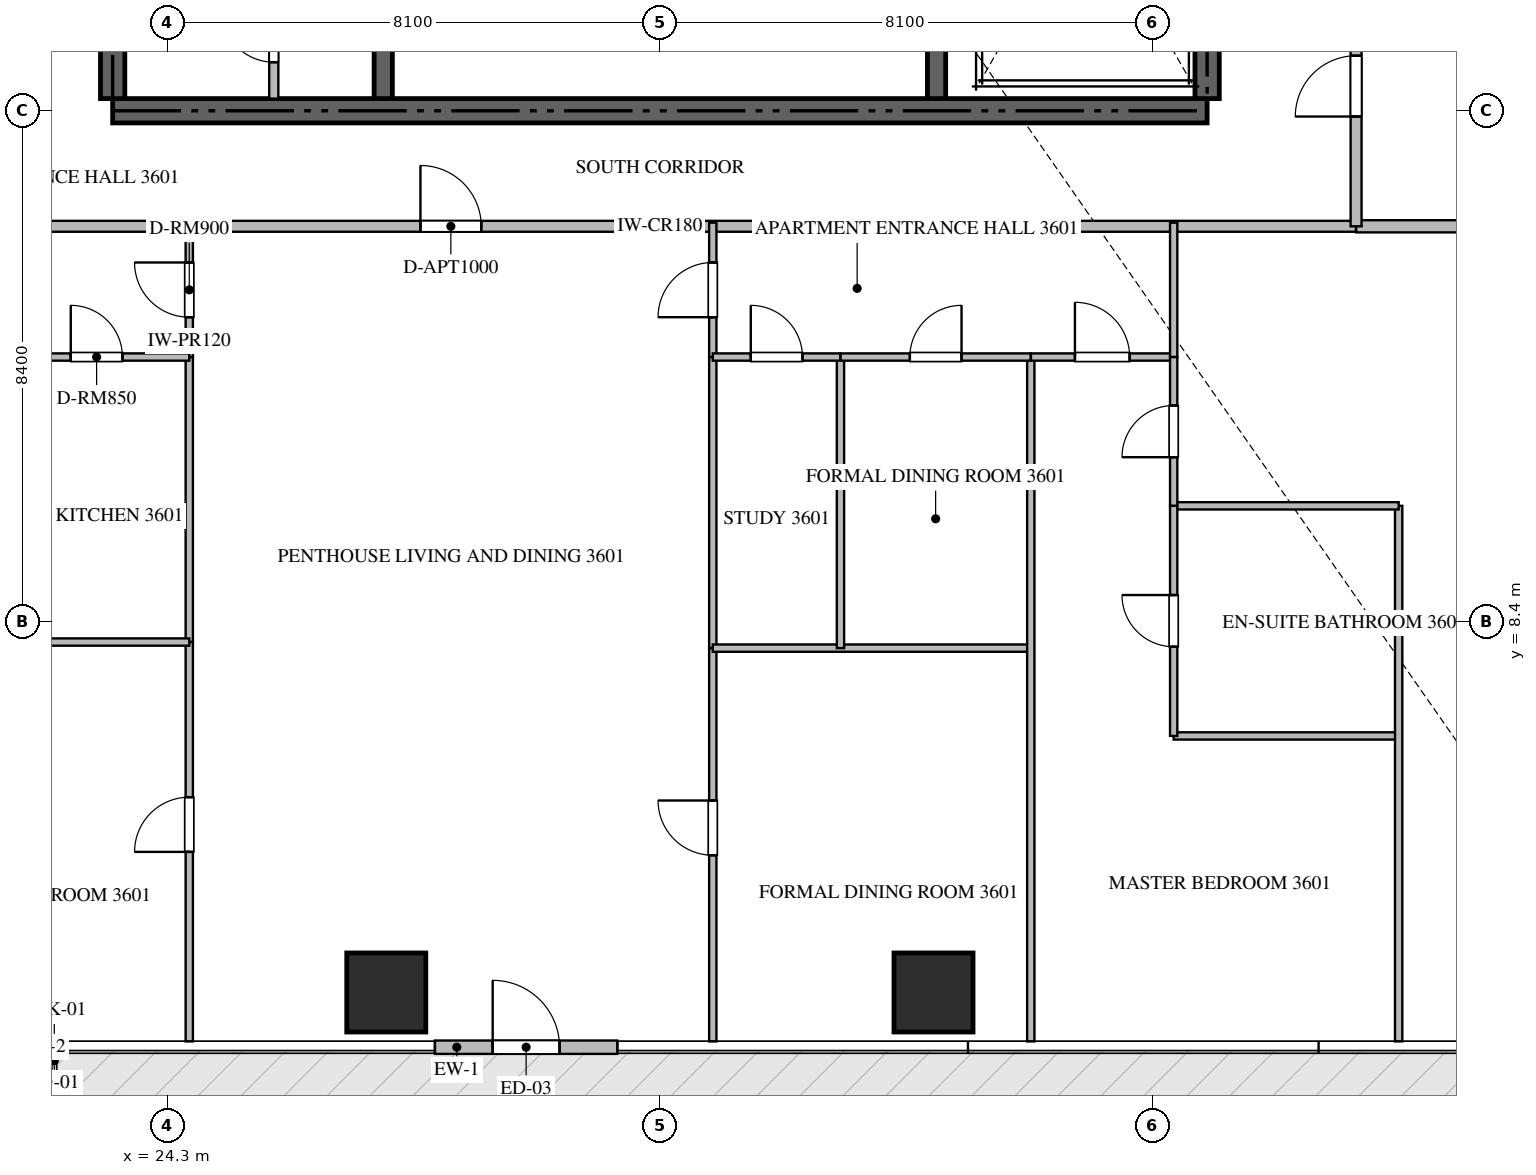
"""IFC4 building model, lengths in metres.
Left out: names, types, materials, properties, quantities, classifications, styles, units other than length and angle.
Written with IfcOpenShell. Run it as: python <this file> out.ifc"""

import sys

from ifc_helpers import new_model, si_unit, direction, frame, frame_2d, origin, origin_2d, place, context, subcontext, project, spatial, rectangle, extrude, source, transform, mapped, element, fill, save


model = new_model("IFC4")
c1 = context("Model", 3, precision=1e-05, world=origin(), true_north=direction((0.0, 1.0)))
c2 = subcontext(c1, "Body", "Model", "MODEL_VIEW")
j1 = project(units=[si_unit("LENGTHUNIT", "METRE"), si_unit("PLANEANGLEUNIT", "RADIAN")], contexts=[c1])
p1 = place(None, origin())
s1 = spatial("IfcSite", under=j1, at=p1, CompositionType="ELEMENT")
p2 = place(p1, origin())
s2 = spatial("IfcBuilding", under=s1, at=p2, CompositionType="ELEMENT")
p3 = place(p2, frame((0.0, 0.0, 146.4)))
s3 = spatial("IfcBuildingStorey", under=s2, at=p3, CompositionType="ELEMENT", Elevation=146.4)
p4 = place(p3, frame((23.4, 16.8, -0.26), z_axis=(0.0, 0.0, 1.0), x_axis=(1.0, 0.0, 0.0)))
e1 = element("IfcWall", 1, at=p4, inside=s3, PredefinedType="SHEAR", context=c2, shape_type="SweptSolid", body=[
    extrude(rectangle(XDim=18.0, YDim=0.4, at=frame_2d((9.0, 0.0))), origin(), (0.0, 0.0, 1.0), 3.748),
])
p5 = place(p3, frame((23.4, 17.0, -0.26), z_axis=(0.0, 0.0, 1.0), x_axis=(0.0, 1.0, 0.0)))
e2 = element("IfcWall", 2, at=p5, inside=s3, PredefinedType="SHEAR", context=c2, shape_type="SweptSolid", body=[
    extrude(rectangle(XDim=4.85, YDim=0.4, at=frame_2d((2.425, 0.0))), origin(), (0.0, 0.0, 1.0), 3.748),
])
p6 = place(p3, frame((41.4, 17.0, -0.26), z_axis=(0.0, 0.0, 1.0), x_axis=(0.0, 1.0, 0.0)))
e3 = element("IfcWall", 3, at=p6, inside=s3, PredefinedType="SHEAR", context=c2, shape_type="SweptSolid", body=[
    extrude(rectangle(XDim=8.35, YDim=0.4, at=frame_2d((4.175, 0.0))), origin(), (0.0, 0.0, 1.0), 3.748),
])
p7 = place(p3, frame((27.85, 17.0, -0.26), z_axis=(0.0, 0.0, 1.0), x_axis=(0.0, 1.0, 0.0)))
e4 = element("IfcWall", 4, at=p7, inside=s3, PredefinedType="SHEAR", context=c2, shape_type="SweptSolid", body=[
    extrude(rectangle(XDim=4.85, YDim=0.3, at=frame_2d((2.425, 0.0))), origin(), (0.0, 0.0, 1.0), 3.748),
])
p8 = place(p3, frame((36.95, 17.0, -0.26), z_axis=(0.0, 0.0, 1.0), x_axis=(0.0, 1.0, 0.0)))
e5 = element("IfcWall", 5, at=p8, inside=s3, PredefinedType="SHEAR", context=c2, shape_type="SweptSolid", body=[
    extrude(rectangle(XDim=8.35, YDim=0.3, at=frame_2d((4.175, 0.0))), origin(), (0.0, 0.0, 1.0), 3.748),
])
m1 = source(origin(), c2, "Body", "SweptSolid", [
    extrude(rectangle(XDim=1.3, YDim=1.3, at=origin_2d()), origin(), (0.0, 0.0, 1.0), 3.75),
])
for number, where, z_axis, x_axis in (
    (6, (27.9, 2.3, -0.26), (0.0, 0.0, 1.0), (1.0, 0.0, 0.0)),
    (7, (36.9, 2.3, -0.26), (0.0, 0.0, 1.0), (1.0, 0.0, 0.0)),
):
    element("IfcColumn", number, at=place(p3, frame(where, z_axis=z_axis, x_axis=x_axis)), inside=s3, PredefinedType="COLUMN", context=c2, shape_type="MappedRepresentation", body=[
        mapped(m1, transform((0.0, 0.0, 0.0), scale=1.0)),
    ])
p9 = place(p3, frame((28.7, 1.4, 0.0), z_axis=(0.0, 0.0, 1.0), x_axis=(1.0, 0.0, 0.0)))
e8 = element("IfcWall", 8, at=p9, inside=s3, PredefinedType="ELEMENTEDWALL", context=c2, shape_type="SweptSolid", body=[
    extrude(rectangle(XDim=3.0, YDim=0.22, at=frame_2d((1.5, 0.0))), origin(), (0.0, 0.0, 1.0), 3.475),
])
p10 = place(p9, frame((0.95, 0.0, 0.0)))
e9 = element("IfcOpeningElement", 9, at=p10, cuts=e8, PredefinedType="OPENING", context=c2, shape_type="SweptSolid", body=[
    extrude(rectangle(XDim=1.1, YDim=2.2, at=frame_2d((0.55, 1.1))), frame((0.0, 0.12, 0.0), z_axis=(0.0, -1.0, 0.0), x_axis=(1.0, 0.0, 0.0)), (0.0, 0.0, 1.0), 0.24),
])
p11 = place(p3, frame((26.05, 17.0, 0.0), z_axis=(0.0, 0.0, 1.0), x_axis=(0.0, 1.0, 0.0)))
e10 = element("IfcWall", 10, at=p11, inside=s3, PredefinedType="PARTITIONING", context=c2, shape_type="SweptSolid", body=[
    extrude(rectangle(XDim=2.048, YDim=0.15, at=frame_2d((1.024, 0.0))), origin(), (0.0, 0.0, 1.0), 3.49),
])
p12 = place(p11, frame((0.599, 0.0, 0.0)))
e11 = element("IfcOpeningElement", 11, at=p12, cuts=e10, PredefinedType="OPENING", context=c2, shape_type="SweptSolid", body=[
    extrude(rectangle(XDim=0.85, YDim=2.1, at=frame_2d((0.425, 1.05))), frame((0.0, 0.085, 0.0), z_axis=(0.0, -1.0, 0.0), x_axis=(1.0, 0.0, 0.0)), (0.0, 0.0, 1.0), 0.17),
])
p13 = place(p3, frame((43.85, 14.9, 0.0), z_axis=(0.0, 0.0, 1.0), x_axis=(1.0, 0.0, 0.0)))
e12 = element("IfcWall", 12, at=p13, inside=s3, PredefinedType="PARTITIONING", context=c2, shape_type="SweptSolid", body=[
    extrude(rectangle(XDim=13.068, YDim=0.2, at=frame_2d((6.534, 0.0))), origin(), (0.0, 0.0, 1.0), 3.49),
])
p14 = place(p3, frame((20.952, 14.9, 0.0), z_axis=(0.0, 0.0, 1.0), x_axis=(1.0, 0.0, 0.0)))
e13 = element("IfcWall", 13, at=p14, inside=s3, PredefinedType="PARTITIONING", context=c2, shape_type="SweptSolid", body=[
    extrude(rectangle(XDim=22.896, YDim=0.18, at=frame_2d((11.448, 0.0))), origin(), (0.0, 0.0, 1.0), 3.49),
])
p15 = place(p14, frame((7.51, 0.0, 0.0)))
e14 = element("IfcOpeningElement", 14, at=p15, cuts=e13, PredefinedType="OPENING", context=c2, shape_type="SweptSolid", body=[
    extrude(rectangle(XDim=1.0, YDim=2.15, at=frame_2d((0.5, 1.075))), frame((0.0, 0.1, 0.0), z_axis=(0.0, -1.0, 0.0), x_axis=(1.0, 0.0, 0.0)), (0.0, 0.0, 1.0), 0.2),
])
p16 = place(p3, frame((43.85, 14.9, 0.0), z_axis=(0.0, 0.0, 1.0), x_axis=(0.0, 1.0, 0.0)))
e15 = element("IfcWall", 15, at=p16, inside=s3, PredefinedType="PARTITIONING", context=c2, shape_type="SweptSolid", body=[
    extrude(rectangle(XDim=18.7, YDim=0.18, at=frame_2d((9.35, 0.0))), origin(), (0.0, 0.0, 1.0), 3.49),
])
p17 = place(p16, frame((1.805, 0.0, 0.0)))
e16 = element("IfcOpeningElement", 16, at=p17, cuts=e15, PredefinedType="OPENING", context=c2, shape_type="SweptSolid", body=[
    extrude(rectangle(XDim=1.0, YDim=2.15, at=frame_2d((0.5, 1.075))), frame((0.0, 0.1, 0.0), z_axis=(0.0, -1.0, 0.0), x_axis=(1.0, 0.0, 0.0)), (0.0, 0.0, 1.0), 0.2),
])
p18 = place(p3, frame((24.66, 12.75, 0.0), z_axis=(0.0, 0.0, 1.0), x_axis=(0.0, 1.0, 0.0)))
e17 = element("IfcWall", 17, at=p18, inside=s3, PredefinedType="PARTITIONING", context=c2, shape_type="SweptSolid", body=[
    extrude(rectangle(XDim=2.21, YDim=0.12, at=frame_2d((1.105, 0.0))), origin(), (0.0, 0.0, 1.0), 3.49),
])
p19 = place(p18, frame((0.655, 0.0, 0.0)))
e18 = element("IfcOpeningElement", 18, at=p19, cuts=e17, PredefinedType="OPENING", context=c2, shape_type="SweptSolid", body=[
    extrude(rectangle(XDim=0.9, YDim=2.1, at=frame_2d((0.45, 1.05))), frame((0.0, 0.07, 0.0), z_axis=(0.0, -1.0, 0.0), x_axis=(1.0, 0.0, 0.0)), (0.0, 0.0, 1.0), 0.14),
])
p20 = place(p3, frame((24.66, 1.495, 0.0), z_axis=(0.0, 0.0, 1.0), x_axis=(0.0, 1.0, 0.0)))
e19 = element("IfcWall", 19, at=p20, inside=s3, PredefinedType="PARTITIONING", context=c2, shape_type="SweptSolid", body=[
    extrude(rectangle(XDim=6.568, YDim=0.12, at=frame_2d((3.284, 0.0))), origin(), (0.0, 0.0, 1.0), 3.49),
])
p21 = place(p20, frame((3.117, 0.0, 0.0)))
e20 = element("IfcOpeningElement", 20, at=p21, cuts=e19, PredefinedType="OPENING", context=c2, shape_type="SweptSolid", body=[
    extrude(rectangle(XDim=0.9, YDim=2.1, at=frame_2d((0.45, 1.05))), frame((0.0, 0.07, 0.0), z_axis=(0.0, -1.0, 0.0), x_axis=(1.0, 0.0, 0.0)), (0.0, 0.0, 1.0), 0.14),
])
p22 = place(p3, frame((24.66, 8.065, 0.0), z_axis=(0.0, 0.0, 1.0), x_axis=(0.0, 1.0, 0.0)))
e21 = element("IfcWall", 21, at=p22, inside=s3, PredefinedType="PARTITIONING", context=c2, shape_type="SweptSolid", body=[
    extrude(rectangle(XDim=4.683, YDim=0.12, at=frame_2d((2.342, 0.0))), origin(), (0.0, 0.0, 1.0), 3.49),
])
p23 = place(p3, frame((19.51, 8.063, 0.0), z_axis=(0.0, 0.0, 1.0), x_axis=(1.0, 0.0, 0.0)))
e22 = element("IfcWall", 22, at=p23, inside=s3, PredefinedType="PARTITIONING", context=c2, shape_type="SweptSolid", body=[
    extrude(rectangle(XDim=5.15, YDim=0.12, at=frame_2d((2.575, 0.0))), origin(), (0.0, 0.0, 1.0), 3.49),
])
p24 = place(p3, frame((21.612, 12.75, 0.0), z_axis=(0.0, 0.0, 1.0), x_axis=(1.0, 0.0, 0.0)))
e23 = element("IfcWall", 23, at=p24, inside=s3, PredefinedType="PARTITIONING", context=c2, shape_type="SweptSolid", body=[
    extrude(rectangle(XDim=3.048, YDim=0.12, at=frame_2d((1.524, 0.0))), origin(), (0.0, 0.0, 1.0), 3.49),
])
p25 = place(p24, frame((1.099, 0.0, 0.0)))
e24 = element("IfcOpeningElement", 24, at=p25, cuts=e23, PredefinedType="OPENING", context=c2, shape_type="SweptSolid", body=[
    extrude(rectangle(XDim=0.85, YDim=2.1, at=frame_2d((0.425, 1.05))), frame((0.0, 0.07, 0.0), z_axis=(0.0, -1.0, 0.0), x_axis=(1.0, 0.0, 0.0)), (0.0, 0.0, 1.0), 0.14),
])
p26 = place(p3, frame((33.27, 12.75, 0.0), z_axis=(0.0, 0.0, 1.0), x_axis=(0.0, 1.0, 0.0)))
e25 = element("IfcWall", 25, at=p26, inside=s3, PredefinedType="PARTITIONING", context=c2, shape_type="SweptSolid", body=[
    extrude(rectangle(XDim=2.21, YDim=0.12, at=frame_2d((1.105, 0.0))), origin(), (0.0, 0.0, 1.0), 3.49),
])
p27 = place(p26, frame((0.655, 0.0, 0.0)))
e26 = element("IfcOpeningElement", 26, at=p27, cuts=e25, PredefinedType="OPENING", context=c2, shape_type="SweptSolid", body=[
    extrude(rectangle(XDim=0.9, YDim=2.1, at=frame_2d((0.45, 1.05))), frame((0.0, 0.07, 0.0), z_axis=(0.0, -1.0, 0.0), x_axis=(1.0, 0.0, 0.0)), (0.0, 0.0, 1.0), 0.14),
])
p28 = place(p3, frame((33.27, 1.495, 0.0), z_axis=(0.0, 0.0, 1.0), x_axis=(0.0, 1.0, 0.0)))
e27 = element("IfcWall", 27, at=p28, inside=s3, PredefinedType="PARTITIONING", context=c2, shape_type="SweptSolid", body=[
    extrude(rectangle(XDim=6.468, YDim=0.12, at=frame_2d((3.234, 0.0))), origin(), (0.0, 0.0, 1.0), 3.49),
])
p29 = place(p28, frame((3.062, 0.0, 0.0)))
e28 = element("IfcOpeningElement", 28, at=p29, cuts=e27, PredefinedType="OPENING", context=c2, shape_type="SweptSolid", body=[
    extrude(rectangle(XDim=0.9, YDim=2.1, at=frame_2d((0.45, 1.05))), frame((0.0, 0.07, 0.0), z_axis=(0.0, -1.0, 0.0), x_axis=(1.0, 0.0, 0.0)), (0.0, 0.0, 1.0), 0.14),
])
p30 = place(p3, frame((33.27, 7.965, 0.0), z_axis=(0.0, 0.0, 1.0), x_axis=(0.0, 1.0, 0.0)))
e29 = element("IfcWall", 29, at=p30, inside=s3, PredefinedType="PARTITIONING", context=c2, shape_type="SweptSolid", body=[
    extrude(rectangle(XDim=4.783, YDim=0.12, at=frame_2d((2.392, 0.0))), origin(), (0.0, 0.0, 1.0), 3.49),
])
p31 = place(p3, frame((33.27, 7.963, 0.0), z_axis=(0.0, 0.0, 1.0), x_axis=(1.0, 0.0, 0.0)))
e30 = element("IfcWall", 30, at=p31, inside=s3, PredefinedType="PARTITIONING", context=c2, shape_type="SweptSolid", body=[
    extrude(rectangle(XDim=5.23, YDim=0.12, at=frame_2d((2.615, 0.0))), origin(), (0.0, 0.0, 1.0), 3.49),
])
p32 = place(p3, frame((38.5, 1.495, 0.0), z_axis=(0.0, 0.0, 1.0), x_axis=(0.0, 1.0, 0.0)))
e31 = element("IfcWall", 31, at=p32, inside=s3, PredefinedType="PARTITIONING", context=c2, shape_type="SweptSolid", body=[
    extrude(rectangle(XDim=11.255, YDim=0.12, at=frame_2d((5.627, 0.0))), origin(), (0.0, 0.0, 1.0), 3.49),
])
p33 = place(p3, frame((35.37, 7.963, 0.0), z_axis=(0.0, 0.0, 1.0), x_axis=(0.0, 1.0, 0.0)))
e32 = element("IfcWall", 32, at=p33, inside=s3, PredefinedType="PARTITIONING", context=c2, shape_type="SweptSolid", body=[
    extrude(rectangle(XDim=4.787, YDim=0.12, at=frame_2d((2.394, 0.0))), origin(), (0.0, 0.0, 1.0), 3.49),
])
p34 = place(p3, frame((33.27, 12.75, 0.0), z_axis=(0.0, 0.0, 1.0), x_axis=(1.0, 0.0, 0.0)))
e33 = element("IfcWall", 33, at=p34, inside=s3, PredefinedType="PARTITIONING", context=c2, shape_type="SweptSolid", body=[
    extrude(rectangle(XDim=2.1, YDim=0.12, at=frame_2d((1.05, 0.0))), origin(), (0.0, 0.0, 1.0), 3.49),
])
p35 = place(p34, frame((0.625, 0.0, 0.0)))
e34 = element("IfcOpeningElement", 34, at=p35, cuts=e33, PredefinedType="OPENING", context=c2, shape_type="SweptSolid", body=[
    extrude(rectangle(XDim=0.85, YDim=2.1, at=frame_2d((0.425, 1.05))), frame((0.0, 0.07, 0.0), z_axis=(0.0, -1.0, 0.0), x_axis=(1.0, 0.0, 0.0)), (0.0, 0.0, 1.0), 0.14),
])
p36 = place(p3, frame((35.372, 12.75, 0.0), z_axis=(0.0, 0.0, 1.0), x_axis=(1.0, 0.0, 0.0)))
e35 = element("IfcWall", 35, at=p36, inside=s3, PredefinedType="PARTITIONING", context=c2, shape_type="SweptSolid", body=[
    extrude(rectangle(XDim=3.128, YDim=0.12, at=frame_2d((1.564, 0.0))), origin(), (0.0, 0.0, 1.0), 3.49),
])
p37 = place(p36, frame((1.139, 0.0, 0.0)))
e36 = element("IfcOpeningElement", 36, at=p37, cuts=e35, PredefinedType="OPENING", context=c2, shape_type="SweptSolid", body=[
    extrude(rectangle(XDim=0.85, YDim=2.1, at=frame_2d((0.425, 1.05))), frame((0.0, 0.07, 0.0), z_axis=(0.0, -1.0, 0.0), x_axis=(1.0, 0.0, 0.0)), (0.0, 0.0, 1.0), 0.14),
])
p38 = place(p3, frame((38.502, 12.75, 0.0), z_axis=(0.0, 0.0, 1.0), x_axis=(1.0, 0.0, 0.0)))
e37 = element("IfcWall", 37, at=p38, inside=s3, PredefinedType="PARTITIONING", context=c2, shape_type="SweptSolid", body=[
    extrude(rectangle(XDim=2.348, YDim=0.12, at=frame_2d((1.174, 0.0))), origin(), (0.0, 0.0, 1.0), 3.49),
])
p39 = place(p38, frame((0.724, 0.0, 0.0)))
e38 = element("IfcOpeningElement", 38, at=p39, cuts=e37, PredefinedType="OPENING", context=c2, shape_type="SweptSolid", body=[
    extrude(rectangle(XDim=0.9, YDim=2.1, at=frame_2d((0.45, 1.05))), frame((0.0, 0.07, 0.0), z_axis=(0.0, -1.0, 0.0), x_axis=(1.0, 0.0, 0.0)), (0.0, 0.0, 1.0), 0.14),
])
p40 = place(p3, frame((40.85, 6.519, 0.0), z_axis=(0.0, 0.0, 1.0), x_axis=(1.0, 0.0, 0.0)))
e39 = element("IfcWall", 39, at=p40, inside=s3, PredefinedType="PARTITIONING", context=c2, shape_type="SweptSolid", body=[
    extrude(rectangle(XDim=3.7, YDim=0.12, at=frame_2d((1.85, 0.0))), origin(), (0.0, 0.0, 1.0), 3.49),
])
p41 = place(p3, frame((44.55, 1.495, 0.0), z_axis=(0.0, 0.0, 1.0), x_axis=(0.0, 1.0, 0.0)))
e40 = element("IfcWall", 40, at=p41, inside=s3, PredefinedType="PARTITIONING", context=c2, shape_type="SweptSolid", body=[
    extrude(rectangle(XDim=8.808, YDim=0.12, at=frame_2d((4.404, 0.0))), origin(), (0.0, 0.0, 1.0), 3.49),
])
p42 = place(p3, frame((40.85, 10.303, 0.0), z_axis=(0.0, 0.0, 1.0), x_axis=(1.0, 0.0, 0.0)))
e41 = element("IfcWall", 41, at=p42, inside=s3, PredefinedType="PARTITIONING", context=c2, shape_type="SweptSolid", body=[
    extrude(rectangle(XDim=3.7, YDim=0.12, at=frame_2d((1.85, 0.0))), origin(), (0.0, 0.0, 1.0), 2.972),
])
p43 = place(p3, frame((40.85, 6.519, 0.0), z_axis=(0.0, 0.0, 1.0), x_axis=(0.0, 1.0, 0.0)))
e42 = element("IfcWall", 42, at=p43, inside=s3, PredefinedType="PARTITIONING", context=c2, shape_type="SweptSolid", body=[
    extrude(rectangle(XDim=3.784, YDim=0.12, at=frame_2d((1.892, 0.0))), origin(), (0.0, 0.0, 1.0), 3.49),
])
p44 = place(p43, frame((1.467, 0.0, 0.0)))
e43 = element("IfcOpeningElement", 43, at=p44, cuts=e42, PredefinedType="OPENING", context=c2, shape_type="SweptSolid", body=[
    extrude(rectangle(XDim=0.85, YDim=2.1, at=frame_2d((0.425, 1.05))), frame((0.0, 0.07, 0.0), z_axis=(0.0, -1.0, 0.0), x_axis=(1.0, 0.0, 0.0)), (0.0, 0.0, 1.0), 0.14),
])
p45 = place(p3, frame((40.85, 10.305, 0.0), z_axis=(0.0, 0.0, 1.0), x_axis=(0.0, 1.0, 0.0)))
e44 = element("IfcWall", 44, at=p45, inside=s3, PredefinedType="PARTITIONING", context=c2, shape_type="SweptSolid", body=[
    extrude(rectangle(XDim=2.445, YDim=0.12, at=frame_2d((1.223, 0.0))), origin(), (0.0, 0.0, 1.0), 3.49),
])
p46 = place(p45, frame((0.798, 0.0, 0.0)))
e45 = element("IfcOpeningElement", 45, at=p46, cuts=e44, PredefinedType="OPENING", context=c2, shape_type="SweptSolid", body=[
    extrude(rectangle(XDim=0.85, YDim=2.1, at=frame_2d((0.425, 1.05))), frame((0.0, 0.07, 0.0), z_axis=(0.0, -1.0, 0.0), x_axis=(1.0, 0.0, 0.0)), (0.0, 0.0, 1.0), 0.14),
])
p47 = place(p3, frame((40.85, 12.752, 0.0), z_axis=(0.0, 0.0, 1.0), x_axis=(0.0, 1.0, 0.0)))
e46 = element("IfcWall", 46, at=p47, inside=s3, PredefinedType="PARTITIONING", context=c2, shape_type="SweptSolid", body=[
    extrude(rectangle(XDim=2.208, YDim=0.12, at=frame_2d((1.104, 0.0))), origin(), (0.0, 0.0, 1.0), 3.49),
])
m2 = source(origin(), c2, "Body", "SweptSolid", [
    extrude(rectangle(XDim=1.1, YDim=2.2, at=frame_2d((0.55, 1.1))), frame((0.0, 0.025, 0.0), z_axis=(0.0, -1.0, 0.0), x_axis=(1.0, 0.0, 0.0)), (0.0, 0.0, 1.0), 0.05),
])
p48 = place(p10, origin())
e47 = element("IfcDoor", 47, at=p48, inside=s3, OperationType="SINGLE_SWING_LEFT", PredefinedType="DOOR", context=c2, shape_type="MappedRepresentation", body=[
    mapped(m2, transform((0.0, 0.0, 0.0), scale=1.0)),
])
fill(e9, e47)
m3 = source(origin(), c2, "Body", "SweptSolid", [
    extrude(rectangle(XDim=0.85, YDim=2.1, at=frame_2d((0.425, 1.05))), frame((0.0, 0.025, 0.0), z_axis=(0.0, -1.0, 0.0), x_axis=(1.0, 0.0, 0.0)), (0.0, 0.0, 1.0), 0.05),
])
p49 = place(p12, origin())
e48 = element("IfcDoor", 48, at=p49, inside=s3, OperationType="SINGLE_SWING_RIGHT", PredefinedType="DOOR", context=c2, shape_type="MappedRepresentation", body=[
    mapped(m3, transform((0.0, 0.0, 0.0), scale=1.0)),
])
fill(e11, e48)
m4 = source(origin(), c2, "Body", "SweptSolid", [
    extrude(rectangle(XDim=1.0, YDim=2.15, at=frame_2d((0.5, 1.075))), frame((0.0, 0.025, 0.0), z_axis=(0.0, -1.0, 0.0), x_axis=(1.0, 0.0, 0.0)), (0.0, 0.0, 1.0), 0.05),
])
p50 = place(p15, origin())
e49 = element("IfcDoor", 49, at=p50, inside=s3, OperationType="SINGLE_SWING_LEFT", PredefinedType="DOOR", context=c2, shape_type="MappedRepresentation", body=[
    mapped(m4, transform((0.0, 0.0, 0.0), scale=1.0)),
])
fill(e14, e49)
p51 = place(p17, origin())
e50 = element("IfcDoor", 50, at=p51, inside=s3, OperationType="SINGLE_SWING_LEFT", PredefinedType="DOOR", context=c2, shape_type="MappedRepresentation", body=[
    mapped(m4, transform((0.0, 0.0, 0.0), scale=1.0)),
])
fill(e16, e50)
m5 = source(origin(), c2, "Body", "SweptSolid", [
    extrude(rectangle(XDim=0.9, YDim=2.1, at=frame_2d((0.45, 1.05))), frame((0.0, 0.025, 0.0), z_axis=(0.0, -1.0, 0.0), x_axis=(1.0, 0.0, 0.0)), (0.0, 0.0, 1.0), 0.05),
])
p52 = place(p19, origin())
e51 = element("IfcDoor", 51, at=p52, inside=s3, OperationType="SINGLE_SWING_RIGHT", PredefinedType="DOOR", context=c2, shape_type="MappedRepresentation", body=[
    mapped(m5, transform((0.0, 0.0, 0.0), scale=1.0)),
])
fill(e18, e51)
p53 = place(p21, origin())
e52 = element("IfcDoor", 52, at=p53, inside=s3, OperationType="SINGLE_SWING_LEFT", PredefinedType="DOOR", context=c2, shape_type="MappedRepresentation", body=[
    mapped(m5, transform((0.0, 0.0, 0.0), scale=1.0)),
])
fill(e20, e52)
p54 = place(p25, origin())
e53 = element("IfcDoor", 53, at=p54, inside=s3, OperationType="SINGLE_SWING_LEFT", PredefinedType="DOOR", context=c2, shape_type="MappedRepresentation", body=[
    mapped(m3, transform((0.0, 0.0, 0.0), scale=1.0)),
])
fill(e24, e53)
p55 = place(p27, origin())
e54 = element("IfcDoor", 54, at=p55, inside=s3, OperationType="SINGLE_SWING_LEFT", PredefinedType="DOOR", context=c2, shape_type="MappedRepresentation", body=[
    mapped(m5, transform((0.0, 0.0, 0.0), scale=1.0)),
])
fill(e26, e54)
p56 = place(p29, origin())
e55 = element("IfcDoor", 55, at=p56, inside=s3, OperationType="SINGLE_SWING_RIGHT", PredefinedType="DOOR", context=c2, shape_type="MappedRepresentation", body=[
    mapped(m5, transform((0.0, 0.0, 0.0), scale=1.0)),
])
fill(e28, e55)
p57 = place(p35, origin())
e56 = element("IfcDoor", 56, at=p57, inside=s3, OperationType="SINGLE_SWING_LEFT", PredefinedType="DOOR", context=c2, shape_type="MappedRepresentation", body=[
    mapped(m3, transform((0.0, 0.0, 0.0), scale=1.0)),
])
fill(e34, e56)
p58 = place(p37, origin())
e57 = element("IfcDoor", 57, at=p58, inside=s3, OperationType="SINGLE_SWING_RIGHT", PredefinedType="DOOR", context=c2, shape_type="MappedRepresentation", body=[
    mapped(m3, transform((0.0, 0.0, 0.0), scale=1.0)),
])
fill(e36, e57)
p59 = place(p39, origin())
e58 = element("IfcDoor", 58, at=p59, inside=s3, OperationType="SINGLE_SWING_LEFT", PredefinedType="DOOR", context=c2, shape_type="MappedRepresentation", body=[
    mapped(m5, transform((0.0, 0.0, 0.0), scale=1.0)),
])
fill(e38, e58)
p60 = place(p44, origin())
e59 = element("IfcDoor", 59, at=p60, inside=s3, OperationType="SINGLE_SWING_RIGHT", PredefinedType="DOOR", context=c2, shape_type="MappedRepresentation", body=[
    mapped(m3, transform((0.0, 0.0, 0.0), scale=1.0)),
])
fill(e43, e59)
p61 = place(p46, origin())
e60 = element("IfcDoor", 60, at=p61, inside=s3, OperationType="SINGLE_SWING_LEFT", PredefinedType="DOOR", context=c2, shape_type="MappedRepresentation", body=[
    mapped(m3, transform((0.0, 0.0, 0.0), scale=1.0)),
])
fill(e45, e60)
save(model, sys.argv[1])
